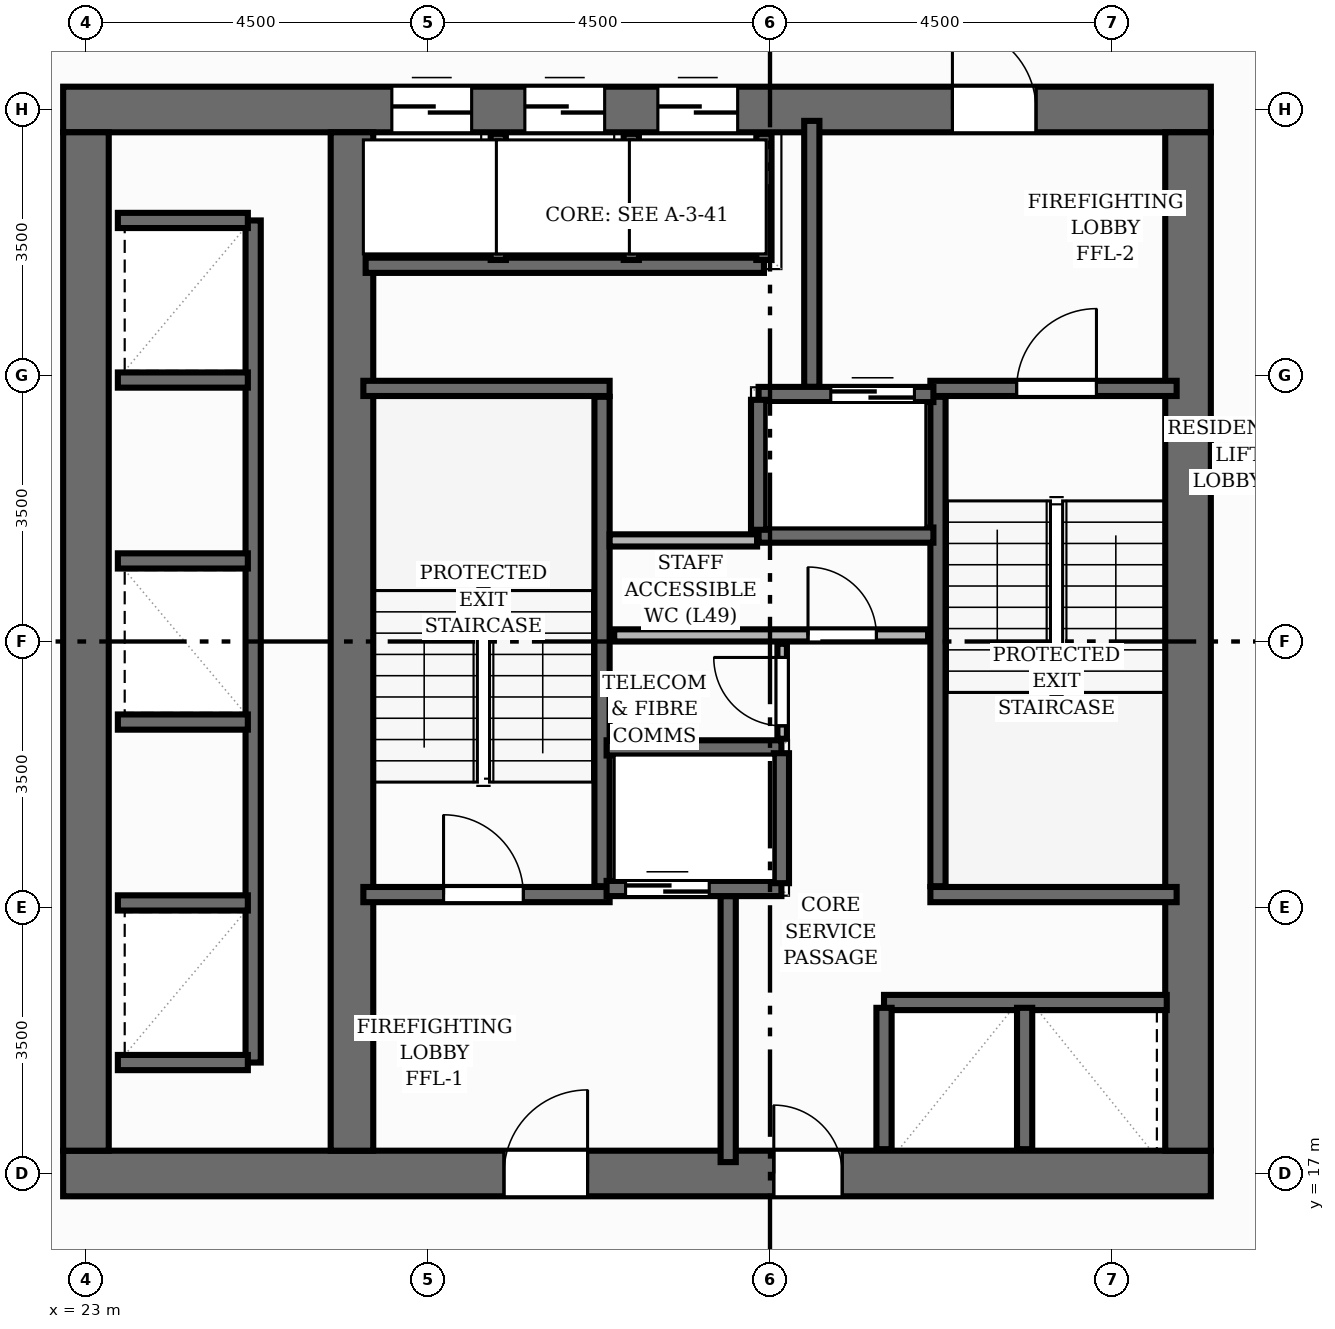
"""IFC4 building model, lengths in metres.
Left out: names, types, materials, properties, quantities, classifications, styles, units other than length and angle.
Written with IfcOpenShell. Run it as: python <this file> out.ifc"""

import sys

from ifc_helpers import new_model, si_unit, direction, frame, frame_2d, origin, place, context, subcontext, project, spatial, rectangle, extrude, element, fill, save


model = new_model("IFC4")
c1 = context("Model", 3, precision=1e-05, world=origin(), true_north=direction((0.0, 1.0)))
c2 = subcontext(c1, "Body", "Model", "MODEL_VIEW")
j1 = project(units=[si_unit("LENGTHUNIT", "METRE"), si_unit("PLANEANGLEUNIT", "RADIAN")], contexts=[c1])
p1 = place(None, origin())
s1 = spatial("IfcSite", under=j1, at=p1, CompositionType="ELEMENT")
p2 = place(p1, origin())
s2 = spatial("IfcBuilding", under=s1, at=p2, CompositionType="ELEMENT")
p3 = place(p2, frame((0.0, 0.0, 166.24)))
s3 = spatial("IfcBuildingStorey", under=s2, at=p3, CompositionType="ELEMENT", Elevation=166.24)
p4 = place(p3, frame((22.7, 17.0, 0.0), z_axis=(0.0, 0.0, 1.0), x_axis=(1.0, 0.0, 0.0)))
e1 = element("IfcWall", 1, at=p4, inside=s3, PredefinedType="SHEAR", context=c2, shape_type="SweptSolid", body=[
    extrude(rectangle(XDim=15.1, YDim=0.6, at=frame_2d((7.55, 0.0))), origin(), (0.0, 0.0, 1.0), 3.2),
])
p5 = place(p4, frame((5.8, 0.0, 0.0)))
e2 = element("IfcOpeningElement", 2, at=p5, cuts=e1, PredefinedType="OPENING", context=c2, shape_type="SweptSolid", body=[
    extrude(rectangle(XDim=1.1, YDim=2.15, at=frame_2d((0.55, 1.075))), frame((0.0, 0.31, 0.0), z_axis=(0.0, -1.0, 0.0), x_axis=(1.0, 0.0, 0.0)), (0.0, 0.0, 1.0), 0.62),
])
p6 = place(p4, frame((9.35, 0.0, 0.0)))
e3 = element("IfcOpeningElement", 3, at=p6, cuts=e1, PredefinedType="OPENING", context=c2, shape_type="SweptSolid", body=[
    extrude(rectangle(XDim=0.9, YDim=2.1, at=frame_2d((0.45, 1.05))), frame((0.0, 0.31, 0.0), z_axis=(0.0, -1.0, 0.0), x_axis=(1.0, 0.0, 0.0)), (0.0, 0.0, 1.0), 0.62),
])
p7 = place(p3, frame((22.7, 31.0, 0.0), z_axis=(0.0, 0.0, 1.0), x_axis=(1.0, 0.0, 0.0)))
e4 = element("IfcWall", 4, at=p7, inside=s3, PredefinedType="SHEAR", context=c2, shape_type="SweptSolid", body=[
    extrude(rectangle(XDim=15.1, YDim=0.6, at=frame_2d((7.55, 0.0))), origin(), (0.0, 0.0, 1.0), 3.2),
])
p8 = place(p7, frame((11.7, 0.0, 0.0)))
e5 = element("IfcOpeningElement", 5, at=p8, cuts=e4, PredefinedType="OPENING", context=c2, shape_type="SweptSolid", body=[
    extrude(rectangle(XDim=1.1, YDim=2.15, at=frame_2d((0.55, 1.075))), frame((0.0, 0.31, 0.0), z_axis=(0.0, -1.0, 0.0), x_axis=(1.0, 0.0, 0.0)), (0.0, 0.0, 1.0), 0.62),
])
p9 = place(p7, frame((4.325, 0.0, 0.0)))
e6 = element("IfcOpeningElement", 6, at=p9, cuts=e4, PredefinedType="OPENING", context=c2, shape_type="SweptSolid", body=[
    extrude(rectangle(XDim=1.05, YDim=2.15, at=frame_2d((0.525, 1.075))), frame((0.0, 0.31, 0.0), z_axis=(0.0, -1.0, 0.0), x_axis=(1.0, 0.0, 0.0)), (0.0, 0.0, 1.0), 0.62),
])
p10 = place(p7, frame((6.075, 0.0, 0.0)))
e7 = element("IfcOpeningElement", 7, at=p10, cuts=e4, PredefinedType="OPENING", context=c2, shape_type="SweptSolid", body=[
    extrude(rectangle(XDim=1.05, YDim=2.15, at=frame_2d((0.525, 1.075))), frame((0.0, 0.31, 0.0), z_axis=(0.0, -1.0, 0.0), x_axis=(1.0, 0.0, 0.0)), (0.0, 0.0, 1.0), 0.62),
])
p11 = place(p7, frame((7.825, 0.0, 0.0)))
e8 = element("IfcOpeningElement", 8, at=p11, cuts=e4, PredefinedType="OPENING", context=c2, shape_type="SweptSolid", body=[
    extrude(rectangle(XDim=1.05, YDim=2.15, at=frame_2d((0.525, 1.075))), frame((0.0, 0.31, 0.0), z_axis=(0.0, -1.0, 0.0), x_axis=(1.0, 0.0, 0.0)), (0.0, 0.0, 1.0), 0.62),
])
for number, where, z_axis, x_axis in (
    (9, (23.0, 17.3, 0.0), (0.0, 0.0, 1.0), (0.0, 1.0, 0.0)),
    (10, (37.5, 17.3, 0.0), (0.0, 0.0, 1.0), (0.0, 1.0, 0.0)),
):
    element("IfcWall", number, at=place(p3, frame(where, z_axis=z_axis, x_axis=x_axis)), inside=s3, PredefinedType="SHEAR", context=c2, shape_type="SweptSolid", body=[
        extrude(rectangle(XDim=13.4, YDim=0.6, at=frame_2d((6.7, 0.0))), origin(), (0.0, 0.0, 1.0), 3.2),
    ])
p12 = place(p3, frame((26.5, 17.3, 0.0), z_axis=(0.0, 0.0, 1.0), x_axis=(0.0, 1.0, 0.0)))
e11 = element("IfcWall", 11, at=p12, inside=s3, PredefinedType="SHEAR", context=c2, shape_type="SweptSolid", body=[
    extrude(rectangle(XDim=13.4, YDim=0.56, at=frame_2d((6.7, 0.0))), origin(), (0.0, 0.0, 1.0), 3.2),
])
p13 = place(p3, frame((29.79, 20.78, 0.0), z_axis=(0.0, 0.0, 1.0), x_axis=(0.0, 1.0, 0.0)))
e12 = element("IfcWall", 12, at=p13, inside=s3, PredefinedType="SHEAR", context=c2, shape_type="SweptSolid", body=[
    extrude(rectangle(XDim=6.44, YDim=0.2, at=frame_2d((3.22, 0.0))), origin(), (0.0, 0.0, 1.0), 3.2),
])
p14 = place(p3, frame((26.65, 27.33, 0.0), z_axis=(0.0, 0.0, 1.0), x_axis=(1.0, 0.0, 0.0)))
e13 = element("IfcWall", 13, at=p14, inside=s3, PredefinedType="SHEAR", context=c2, shape_type="SweptSolid", body=[
    extrude(rectangle(XDim=3.24, YDim=0.2, at=frame_2d((1.62, 0.0))), origin(), (0.0, 0.0, 1.0), 3.2),
])
p15 = place(p3, frame((26.65, 20.67, 0.0), z_axis=(0.0, 0.0, 1.0), x_axis=(1.0, 0.0, 0.0)))
e14 = element("IfcWall", 14, at=p15, inside=s3, PredefinedType="SHEAR", context=c2, shape_type="SweptSolid", body=[
    extrude(rectangle(XDim=3.24, YDim=0.2, at=frame_2d((1.62, 0.0))), origin(), (0.0, 0.0, 1.0), 3.2),
])
p16 = place(p15, frame((1.055, 0.0, 0.0)))
e15 = element("IfcOpeningElement", 15, at=p16, cuts=e14, PredefinedType="OPENING", context=c2, shape_type="SweptSolid", body=[
    extrude(rectangle(XDim=1.05, YDim=2.15, at=frame_2d((0.525, 1.075))), frame((0.0, 0.11, 0.0), z_axis=(0.0, -1.0, 0.0), x_axis=(1.0, 0.0, 0.0)), (0.0, 0.0, 1.0), 0.22),
])
p17 = place(p3, frame((34.21, 20.78, 0.0), z_axis=(0.0, 0.0, 1.0), x_axis=(0.0, 1.0, 0.0)))
e16 = element("IfcWall", 16, at=p17, inside=s3, PredefinedType="SHEAR", context=c2, shape_type="SweptSolid", body=[
    extrude(rectangle(XDim=6.44, YDim=0.2, at=frame_2d((3.22, 0.0))), origin(), (0.0, 0.0, 1.0), 3.2),
])
p18 = place(p3, frame((34.11, 20.67, 0.0), z_axis=(0.0, 0.0, 1.0), x_axis=(1.0, 0.0, 0.0)))
e17 = element("IfcWall", 17, at=p18, inside=s3, PredefinedType="SHEAR", context=c2, shape_type="SweptSolid", body=[
    extrude(rectangle(XDim=3.24, YDim=0.2, at=frame_2d((1.62, 0.0))), origin(), (0.0, 0.0, 1.0), 3.2),
])
p19 = place(p3, frame((34.11, 27.33, 0.0), z_axis=(0.0, 0.0, 1.0), x_axis=(1.0, 0.0, 0.0)))
e18 = element("IfcWall", 18, at=p19, inside=s3, PredefinedType="SHEAR", context=c2, shape_type="SweptSolid", body=[
    extrude(rectangle(XDim=3.24, YDim=0.2, at=frame_2d((1.62, 0.0))), origin(), (0.0, 0.0, 1.0), 3.2),
])
p20 = place(p19, frame((1.135, 0.0, 0.0)))
e19 = element("IfcOpeningElement", 19, at=p20, cuts=e18, PredefinedType="OPENING", context=c2, shape_type="SweptSolid", body=[
    extrude(rectangle(XDim=1.05, YDim=2.15, at=frame_2d((0.525, 1.075))), frame((0.0, 0.11, 0.0), z_axis=(0.0, -1.0, 0.0), x_axis=(1.0, 0.0, 0.0)), (0.0, 0.0, 1.0), 0.22),
])
for number, where, z_axis, x_axis in (
    (20, (31.45, 17.15, 0.0), (0.0, 0.0, 1.0), (0.0, 1.0, 0.0)),
    (21, (32.55, 27.35, 0.0), (0.0, 0.0, 1.0), (0.0, 1.0, 0.0)),
):
    element("IfcWall", number, at=place(p3, frame(where, z_axis=z_axis, x_axis=x_axis)), inside=s3, PredefinedType="SHEAR", context=c2, shape_type="SweptSolid", body=[
        extrude(rectangle(XDim=3.5, YDim=0.2, at=frame_2d((1.75, 0.0))), origin(), (0.0, 0.0, 1.0), 3.2),
    ])
p21 = place(p3, frame((29.85, 20.75, 0.0), z_axis=(0.0, 0.0, 1.0), x_axis=(1.0, 0.0, 0.0)))
e22 = element("IfcWall", 22, at=p21, inside=s3, PredefinedType="SHEAR", context=c2, shape_type="SweptSolid", body=[
    extrude(rectangle(XDim=2.3, YDim=0.2, at=frame_2d((1.15, 0.0))), origin(), (0.0, 0.0, 1.0), 3.2),
])
p22 = place(p21, frame((0.25, 0.0, 0.0)))
e23 = element("IfcOpeningElement", 23, at=p22, cuts=e22, PredefinedType="OPENING", context=c2, shape_type="SweptSolid", body=[
    extrude(rectangle(XDim=1.1, YDim=2.15, at=frame_2d((0.55, 1.075))), frame((0.0, 0.11, 0.0), z_axis=(0.0, -1.0, 0.0), x_axis=(1.0, 0.0, 0.0)), (0.0, 0.0, 1.0), 0.22),
])
p23 = place(p3, frame((29.85, 22.6, 0.0), z_axis=(0.0, 0.0, 1.0), x_axis=(1.0, 0.0, 0.0)))
e24 = element("IfcWall", 24, at=p23, inside=s3, PredefinedType="SHEAR", context=c2, shape_type="SweptSolid", body=[
    extrude(rectangle(XDim=2.3, YDim=0.2, at=frame_2d((1.15, 0.0))), origin(), (0.0, 0.0, 1.0), 3.2),
])
p24 = place(p3, frame((32.15, 20.82, 0.0), z_axis=(0.0, 0.0, 1.0), x_axis=(0.0, 1.0, 0.0)))
e25 = element("IfcWall", 25, at=p24, inside=s3, PredefinedType="SHEAR", context=c2, shape_type="SweptSolid", body=[
    extrude(rectangle(XDim=1.71, YDim=0.2, at=frame_2d((0.855, 0.0))), origin(), (0.0, 0.0, 1.0), 3.2),
])
p25 = place(p3, frame((31.85, 27.25, 0.0), z_axis=(0.0, 0.0, 1.0), x_axis=(1.0, 0.0, 0.0)))
e26 = element("IfcWall", 26, at=p25, inside=s3, PredefinedType="SHEAR", context=c2, shape_type="SweptSolid", body=[
    extrude(rectangle(XDim=2.3, YDim=0.2, at=frame_2d((1.15, 0.0))), origin(), (0.0, 0.0, 1.0), 3.2),
])
p26 = place(p25, frame((0.95, 0.0, 0.0)))
e27 = element("IfcOpeningElement", 27, at=p26, cuts=e26, PredefinedType="OPENING", context=c2, shape_type="SweptSolid", body=[
    extrude(rectangle(XDim=1.1, YDim=2.15, at=frame_2d((0.55, 1.075))), frame((0.0, 0.11, 0.0), z_axis=(0.0, -1.0, 0.0), x_axis=(1.0, 0.0, 0.0)), (0.0, 0.0, 1.0), 0.22),
])
p27 = place(p3, frame((31.85, 25.4, 0.0), z_axis=(0.0, 0.0, 1.0), x_axis=(1.0, 0.0, 0.0)))
e28 = element("IfcWall", 28, at=p27, inside=s3, PredefinedType="SHEAR", context=c2, shape_type="SweptSolid", body=[
    extrude(rectangle(XDim=2.3, YDim=0.2, at=frame_2d((1.15, 0.0))), origin(), (0.0, 0.0, 1.0), 3.2),
])
p28 = place(p3, frame((31.85, 25.47, 0.0), z_axis=(0.0, 0.0, 1.0), x_axis=(0.0, 1.0, 0.0)))
e29 = element("IfcWall", 29, at=p28, inside=s3, PredefinedType="SHEAR", context=c2, shape_type="SweptSolid", body=[
    extrude(rectangle(XDim=1.71, YDim=0.2, at=frame_2d((0.855, 0.0))), origin(), (0.0, 0.0, 1.0), 3.2),
])
p29 = place(p3, frame((25.2, 18.46, 0.0), z_axis=(0.0, 0.0, 1.0), x_axis=(0.0, 1.0, 0.0)))
e30 = element("IfcWall", 30, at=p29, inside=s3, PredefinedType="SHEAR", context=c2, shape_type="SweptSolid", body=[
    extrude(rectangle(XDim=11.08, YDim=0.2, at=frame_2d((5.54, 0.0))), origin(), (0.0, 0.0, 1.0), 3.2),
])
for number, where, z_axis, x_axis in (
    (31, (23.42, 18.46, 0.0), (0.0, 0.0, 1.0), (1.0, 0.0, 0.0)),
    (32, (23.42, 29.54, 0.0), (0.0, 0.0, 1.0), (1.0, 0.0, 0.0)),
    (33, (23.42, 20.56, 0.0), (0.0, 0.0, 1.0), (1.0, 0.0, 0.0)),
    (34, (23.42, 22.94, 0.0), (0.0, 0.0, 1.0), (1.0, 0.0, 0.0)),
    (35, (23.42, 25.06, 0.0), (0.0, 0.0, 1.0), (1.0, 0.0, 0.0)),
    (36, (23.42, 27.44, 0.0), (0.0, 0.0, 1.0), (1.0, 0.0, 0.0)),
):
    element("IfcWall", number, at=place(p3, frame(where, z_axis=z_axis, x_axis=x_axis)), inside=s3, PredefinedType="SHEAR", context=c2, shape_type="SweptSolid", body=[
        extrude(rectangle(XDim=1.71, YDim=0.2, at=frame_2d((0.855, 0.0))), origin(), (0.0, 0.0, 1.0), 3.2),
    ])
p30 = place(p3, frame((26.68, 28.95, 0.0), z_axis=(0.0, 0.0, 1.0), x_axis=(1.0, 0.0, 0.0)))
e37 = element("IfcWall", 37, at=p30, inside=s3, PredefinedType="SHEAR", context=c2, shape_type="SweptSolid", body=[
    extrude(rectangle(XDim=5.24, YDim=0.2, at=frame_2d((2.62, 0.0))), origin(), (0.0, 0.0, 1.0), 3.2),
])
for number, where, z_axis, x_axis in (
    (38, (31.92, 29.02, 0.0), (0.0, 0.0, 1.0), (0.0, 1.0, 0.0)),
    (39, (28.425, 29.02, 0.0), (0.0, 0.0, 1.0), (0.0, 1.0, 0.0)),
    (40, (30.175, 29.02, 0.0), (0.0, 0.0, 1.0), (0.0, 1.0, 0.0)),
):
    element("IfcWall", number, at=place(p3, frame(where, z_axis=z_axis, x_axis=x_axis)), inside=s3, PredefinedType="SHEAR", context=c2, shape_type="SweptSolid", body=[
        extrude(rectangle(XDim=1.66, YDim=0.2, at=frame_2d((0.83, 0.0))), origin(), (0.0, 0.0, 1.0), 3.2),
    ])
p31 = place(p3, frame((33.5, 19.25, 0.0), z_axis=(0.0, 0.0, 1.0), x_axis=(1.0, 0.0, 0.0)))
e41 = element("IfcWall", 41, at=p31, inside=s3, PredefinedType="SHEAR", context=c2, shape_type="SweptSolid", body=[
    extrude(rectangle(XDim=3.72, YDim=0.2, at=frame_2d((1.86, 0.0))), origin(), (0.0, 0.0, 1.0), 3.2),
])
for number, where, z_axis, x_axis in (
    (42, (33.5, 17.32, 0.0), (0.0, 0.0, 1.0), (0.0, 1.0, 0.0)),
    (43, (35.35, 17.32, 0.0), (0.0, 0.0, 1.0), (0.0, 1.0, 0.0)),
):
    element("IfcWall", number, at=place(p3, frame(where, z_axis=z_axis, x_axis=x_axis)), inside=s3, PredefinedType="SHEAR", context=c2, shape_type="SweptSolid", body=[
        extrude(rectangle(XDim=1.86, YDim=0.2, at=frame_2d((0.93, 0.0))), origin(), (0.0, 0.0, 1.0), 3.2),
    ])
p32 = place(p3, frame((29.95, 24.08, 0.0), z_axis=(0.0, 0.0, 1.0), x_axis=(1.0, 0.0, 0.0)))
e44 = element("IfcWall", 44, at=p32, inside=s3, PredefinedType="PLUMBINGWALL", context=c2, shape_type="SweptSolid", body=[
    extrude(rectangle(XDim=4.13, YDim=0.16, at=frame_2d((2.065, 0.0))), origin(), (0.0, 0.0, 1.0), 2.955),
])
p33 = place(p32, frame((2.55, 0.0, 0.0)))
e45 = element("IfcOpeningElement", 45, at=p33, cuts=e44, PredefinedType="OPENING", context=c2, shape_type="SweptSolid", body=[
    extrude(rectangle(XDim=0.9, YDim=2.1, at=frame_2d((0.45, 1.05))), frame((0.0, 0.09, 0.0), z_axis=(0.0, -1.0, 0.0), x_axis=(1.0, 0.0, 0.0)), (0.0, 0.0, 1.0), 0.18),
])
p34 = place(p3, frame((32.16, 22.72, 0.0), z_axis=(0.0, 0.0, 1.0), x_axis=(0.0, 1.0, 0.0)))
e46 = element("IfcWall", 46, at=p34, inside=s3, PredefinedType="PARTITIONING", context=c2, shape_type="SweptSolid", body=[
    extrude(rectangle(XDim=1.25, YDim=0.125, at=frame_2d((0.625, 0.0))), origin(), (0.0, 0.0, 1.0), 2.955),
])
p35 = place(p34, frame((0.17, 0.0, 0.0)))
e47 = element("IfcOpeningElement", 47, at=p35, cuts=e46, PredefinedType="OPENING", context=c2, shape_type="SweptSolid", body=[
    extrude(rectangle(XDim=0.9, YDim=2.1, at=frame_2d((0.45, 1.05))), frame((0.0, 0.073, 0.0), z_axis=(0.0, -1.0, 0.0), x_axis=(1.0, 0.0, 0.0)), (0.0, 0.0, 1.0), 0.145),
])
p36 = place(p3, frame((29.89, 25.33, 0.0), z_axis=(0.0, 0.0, 1.0), x_axis=(1.0, 0.0, 0.0)))
e48 = element("IfcWall", 48, at=p36, inside=s3, PredefinedType="PLUMBINGWALL", context=c2, shape_type="SweptSolid", body=[
    extrude(rectangle(XDim=1.94, YDim=0.16, at=frame_2d((0.97, 0.0))), origin(), (0.0, 0.0, 1.0), 2.955),
])
p37 = place(p16, origin())
e49 = element("IfcDoor", 49, at=p37, inside=s3, OperationType="SINGLE_SWING_LEFT", PredefinedType="DOOR", context=c2, shape_type="SweptSolid", body=[
    extrude(rectangle(XDim=1.05, YDim=2.15, at=frame_2d((0.525, 1.075))), frame((0.0, 0.025, 0.0), z_axis=(0.0, -1.0, 0.0), x_axis=(1.0, 0.0, 0.0)), (0.0, 0.0, 1.0), 0.05),
])
fill(e15, e49)
p38 = place(p20, origin())
e50 = element("IfcDoor", 50, at=p38, inside=s3, OperationType="SINGLE_SWING_RIGHT", PredefinedType="DOOR", context=c2, shape_type="SweptSolid", body=[
    extrude(rectangle(XDim=1.05, YDim=2.15, at=frame_2d((0.525, 1.075))), frame((0.0, 0.025, 0.0), z_axis=(0.0, -1.0, 0.0), x_axis=(1.0, 0.0, 0.0)), (0.0, 0.0, 1.0), 0.05),
])
fill(e19, e50)
p39 = place(p5, origin())
e51 = element("IfcDoor", 51, at=p39, inside=s3, OperationType="SINGLE_SWING_RIGHT", PredefinedType="DOOR", context=c2, shape_type="SweptSolid", body=[
    extrude(rectangle(XDim=1.1, YDim=2.15, at=frame_2d((0.55, 1.075))), frame((0.0, 0.025, 0.0), z_axis=(0.0, -1.0, 0.0), x_axis=(1.0, 0.0, 0.0)), (0.0, 0.0, 1.0), 0.05),
])
fill(e2, e51)
p40 = place(p8, origin())
e52 = element("IfcDoor", 52, at=p40, inside=s3, OperationType="SINGLE_SWING_LEFT", PredefinedType="DOOR", context=c2, shape_type="SweptSolid", body=[
    extrude(rectangle(XDim=1.1, YDim=2.15, at=frame_2d((0.55, 1.075))), frame((0.0, 0.025, 0.0), z_axis=(0.0, -1.0, 0.0), x_axis=(1.0, 0.0, 0.0)), (0.0, 0.0, 1.0), 0.05),
])
fill(e5, e52)
p41 = place(p22, origin())
e53 = element("IfcDoor", 53, at=p41, inside=s3, OperationType="DOUBLE_DOOR_SLIDING", PredefinedType="DOOR", context=c2, shape_type="SweptSolid", body=[
    extrude(rectangle(XDim=1.1, YDim=2.15, at=frame_2d((0.55, 1.075))), frame((0.0, 0.025, 0.0), z_axis=(0.0, -1.0, 0.0), x_axis=(1.0, 0.0, 0.0)), (0.0, 0.0, 1.0), 0.05),
])
fill(e23, e53)
p42 = place(p26, origin())
e54 = element("IfcDoor", 54, at=p42, inside=s3, OperationType="DOUBLE_DOOR_SLIDING", PredefinedType="DOOR", context=c2, shape_type="SweptSolid", body=[
    extrude(rectangle(XDim=1.1, YDim=2.15, at=frame_2d((0.55, 1.075))), frame((0.0, 0.025, 0.0), z_axis=(0.0, -1.0, 0.0), x_axis=(1.0, 0.0, 0.0)), (0.0, 0.0, 1.0), 0.05),
])
fill(e27, e54)
p43 = place(p9, origin())
e55 = element("IfcDoor", 55, at=p43, inside=s3, OperationType="DOUBLE_DOOR_SLIDING", PredefinedType="DOOR", context=c2, shape_type="SweptSolid", body=[
    extrude(rectangle(XDim=1.05, YDim=2.15, at=frame_2d((0.525, 1.075))), frame((0.0, 0.025, 0.0), z_axis=(0.0, -1.0, 0.0), x_axis=(1.0, 0.0, 0.0)), (0.0, 0.0, 1.0), 0.05),
])
fill(e6, e55)
p44 = place(p10, origin())
e56 = element("IfcDoor", 56, at=p44, inside=s3, OperationType="DOUBLE_DOOR_SLIDING", PredefinedType="DOOR", context=c2, shape_type="SweptSolid", body=[
    extrude(rectangle(XDim=1.05, YDim=2.15, at=frame_2d((0.525, 1.075))), frame((0.0, 0.025, 0.0), z_axis=(0.0, -1.0, 0.0), x_axis=(1.0, 0.0, 0.0)), (0.0, 0.0, 1.0), 0.05),
])
fill(e7, e56)
p45 = place(p11, origin())
e57 = element("IfcDoor", 57, at=p45, inside=s3, OperationType="DOUBLE_DOOR_SLIDING", PredefinedType="DOOR", context=c2, shape_type="SweptSolid", body=[
    extrude(rectangle(XDim=1.05, YDim=2.15, at=frame_2d((0.525, 1.075))), frame((0.0, 0.025, 0.0), z_axis=(0.0, -1.0, 0.0), x_axis=(1.0, 0.0, 0.0)), (0.0, 0.0, 1.0), 0.05),
])
fill(e8, e57)
p46 = place(p6, origin())
e58 = element("IfcDoor", 58, at=p46, inside=s3, OperationType="SINGLE_SWING_LEFT", PredefinedType="DOOR", context=c2, shape_type="SweptSolid", body=[
    extrude(rectangle(XDim=0.9, YDim=2.1, at=frame_2d((0.45, 1.05))), frame((0.0, 0.025, 0.0), z_axis=(0.0, -1.0, 0.0), x_axis=(1.0, 0.0, 0.0)), (0.0, 0.0, 1.0), 0.05),
])
fill(e3, e58)
p47 = place(p33, origin())
e59 = element("IfcDoor", 59, at=p47, inside=s3, OperationType="SINGLE_SWING_LEFT", PredefinedType="DOOR", context=c2, shape_type="SweptSolid", body=[
    extrude(rectangle(XDim=0.9, YDim=2.1, at=frame_2d((0.45, 1.05))), frame((0.0, 0.025, 0.0), z_axis=(0.0, -1.0, 0.0), x_axis=(1.0, 0.0, 0.0)), (0.0, 0.0, 1.0), 0.05),
])
fill(e45, e59)
p48 = place(p35, origin())
e60 = element("IfcDoor", 60, at=p48, inside=s3, OperationType="SINGLE_SWING_RIGHT", PredefinedType="DOOR", context=c2, shape_type="SweptSolid", body=[
    extrude(rectangle(XDim=0.9, YDim=2.1, at=frame_2d((0.45, 1.05))), frame((0.0, 0.025, 0.0), z_axis=(0.0, -1.0, 0.0), x_axis=(1.0, 0.0, 0.0)), (0.0, 0.0, 1.0), 0.05),
])
fill(e47, e60)
save(model, sys.argv[1])
